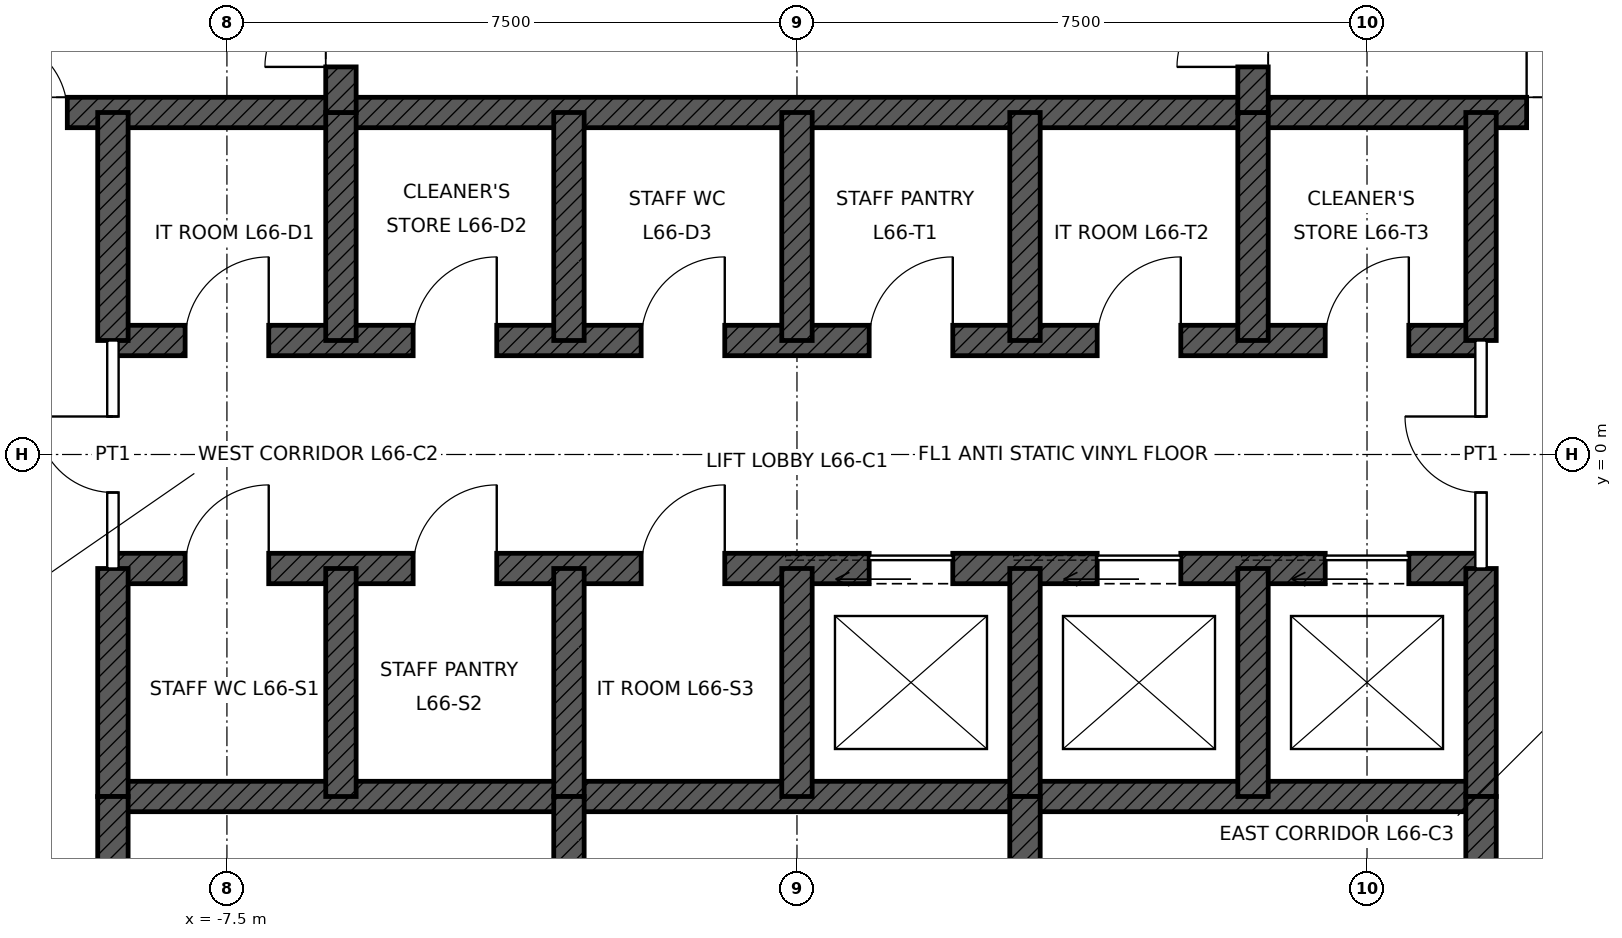
"""IFC4 building model, lengths in metres.
Left out: names, types, materials, properties, quantities, classifications, styles, units other than length and angle.
Written with IfcOpenShell. Run it as: python <this file> out.ifc"""

import sys

from ifc_helpers import new_model, si_unit, direction, frame, frame_2d, origin, place, context, subcontext, project, spatial, rectangle, extrude, element, fill, save


model = new_model("IFC4")
c1 = context("Model", 3, precision=1e-05, world=origin(), true_north=direction((0.0, 1.0)))
c2 = subcontext(c1, "Body", "Model", "MODEL_VIEW")
j1 = project(units=[si_unit("LENGTHUNIT", "METRE"), si_unit("PLANEANGLEUNIT", "RADIAN")], contexts=[c1])
p1 = place(None, origin())
s1 = spatial("IfcSite", under=j1, at=p1, CompositionType="ELEMENT")
p2 = place(p1, origin())
s2 = spatial("IfcBuilding", under=s1, at=p2, CompositionType="ELEMENT")
p3 = place(p2, frame((0.0, 0.0, 299.9)))
s3 = spatial("IfcBuildingStorey", under=s2, at=p3, CompositionType="ELEMENT", Elevation=299.9)
p4 = place(p3, frame((-11.0, 4.5, 0.0), z_axis=(0.0, 0.0, 1.0), x_axis=(1.0, 0.0, 0.0)))
e1 = element("IfcWall", 1, at=p4, inside=s3, PredefinedType="SHEAR", context=c2, shape_type="SweptSolid", body=[
    extrude(rectangle(XDim=22.0, YDim=0.4, at=frame_2d((11.0, 0.0))), origin(), (0.0, 0.0, 1.0), 4.0),
])
p5 = place(p4, frame((0.4, 0.0, 0.0)))
e2 = element("IfcOpeningElement", 2, at=p5, cuts=e1, PredefinedType="OPENING", context=c2, shape_type="SweptSolid", body=[
    extrude(rectangle(XDim=1.0, YDim=2.1, at=frame_2d((0.5, 1.05))), frame((0.0, 0.21, 0.0), z_axis=(0.0, -1.0, 0.0), x_axis=(1.0, 0.0, 0.0)), (0.0, 0.0, 1.0), 0.42),
])
p6 = place(p4, frame((20.6, 0.0, 0.0)))
e3 = element("IfcOpeningElement", 3, at=p6, cuts=e1, PredefinedType="OPENING", context=c2, shape_type="SweptSolid", body=[
    extrude(rectangle(XDim=1.0, YDim=2.1, at=frame_2d((0.5, 1.05))), frame((0.0, 0.21, 0.0), z_axis=(0.0, -1.0, 0.0), x_axis=(1.0, 0.0, 0.0)), (0.0, 0.0, 1.0), 0.42),
])
p7 = place(p3, frame((-9.0, 1.5, 0.0), z_axis=(0.0, 0.0, 1.0), x_axis=(1.0, 0.0, 0.0)))
e4 = element("IfcWall", 4, at=p7, inside=s3, PredefinedType="SHEAR", context=c2, shape_type="SweptSolid", body=[
    extrude(rectangle(XDim=18.0, YDim=0.4, at=frame_2d((9.0, 0.0))), origin(), (0.0, 0.0, 1.0), 4.0),
])
p8 = place(p7, frame((0.95, 0.0, 0.0)))
e5 = element("IfcOpeningElement", 5, at=p8, cuts=e4, PredefinedType="OPENING", context=c2, shape_type="SweptSolid", body=[
    extrude(rectangle(XDim=1.1, YDim=2.1, at=frame_2d((0.55, 1.05))), frame((0.0, 0.21, 0.0), z_axis=(0.0, -1.0, 0.0), x_axis=(1.0, 0.0, 0.0)), (0.0, 0.0, 1.0), 0.42),
])
p9 = place(p7, frame((3.95, 0.0, 0.0)))
e6 = element("IfcOpeningElement", 6, at=p9, cuts=e4, PredefinedType="OPENING", context=c2, shape_type="SweptSolid", body=[
    extrude(rectangle(XDim=1.1, YDim=2.1, at=frame_2d((0.55, 1.05))), frame((0.0, 0.21, 0.0), z_axis=(0.0, -1.0, 0.0), x_axis=(1.0, 0.0, 0.0)), (0.0, 0.0, 1.0), 0.42),
])
p10 = place(p7, frame((6.95, 0.0, 0.0)))
e7 = element("IfcOpeningElement", 7, at=p10, cuts=e4, PredefinedType="OPENING", context=c2, shape_type="SweptSolid", body=[
    extrude(rectangle(XDim=1.1, YDim=2.1, at=frame_2d((0.55, 1.05))), frame((0.0, 0.21, 0.0), z_axis=(0.0, -1.0, 0.0), x_axis=(1.0, 0.0, 0.0)), (0.0, 0.0, 1.0), 0.42),
])
p11 = place(p7, frame((9.95, 0.0, 0.0)))
e8 = element("IfcOpeningElement", 8, at=p11, cuts=e4, PredefinedType="OPENING", context=c2, shape_type="SweptSolid", body=[
    extrude(rectangle(XDim=1.1, YDim=2.1, at=frame_2d((0.55, 1.05))), frame((0.0, 0.21, 0.0), z_axis=(0.0, -1.0, 0.0), x_axis=(1.0, 0.0, 0.0)), (0.0, 0.0, 1.0), 0.42),
])
p12 = place(p7, frame((12.95, 0.0, 0.0)))
e9 = element("IfcOpeningElement", 9, at=p12, cuts=e4, PredefinedType="OPENING", context=c2, shape_type="SweptSolid", body=[
    extrude(rectangle(XDim=1.1, YDim=2.1, at=frame_2d((0.55, 1.05))), frame((0.0, 0.21, 0.0), z_axis=(0.0, -1.0, 0.0), x_axis=(1.0, 0.0, 0.0)), (0.0, 0.0, 1.0), 0.42),
])
p13 = place(p7, frame((15.95, 0.0, 0.0)))
e10 = element("IfcOpeningElement", 10, at=p13, cuts=e4, PredefinedType="OPENING", context=c2, shape_type="SweptSolid", body=[
    extrude(rectangle(XDim=1.1, YDim=2.1, at=frame_2d((0.55, 1.05))), frame((0.0, 0.21, 0.0), z_axis=(0.0, -1.0, 0.0), x_axis=(1.0, 0.0, 0.0)), (0.0, 0.0, 1.0), 0.42),
])
p14 = place(p3, frame((-9.0, -1.5, 0.0), z_axis=(0.0, 0.0, 1.0), x_axis=(1.0, 0.0, 0.0)))
e11 = element("IfcWall", 11, at=p14, inside=s3, PredefinedType="SHEAR", context=c2, shape_type="SweptSolid", body=[
    extrude(rectangle(XDim=18.0, YDim=0.4, at=frame_2d((9.0, 0.0))), origin(), (0.0, 0.0, 1.0), 4.0),
])
p15 = place(p14, frame((9.95, 0.0, 0.0)))
e12 = element("IfcOpeningElement", 12, at=p15, cuts=e11, PredefinedType="OPENING", context=c2, shape_type="SweptSolid", body=[
    extrude(rectangle(XDim=1.1, YDim=2.1, at=frame_2d((0.55, 1.05))), frame((0.0, 0.21, 0.0), z_axis=(0.0, -1.0, 0.0), x_axis=(1.0, 0.0, 0.0)), (0.0, 0.0, 1.0), 0.42),
])
p16 = place(p14, frame((12.95, 0.0, 0.0)))
e13 = element("IfcOpeningElement", 13, at=p16, cuts=e11, PredefinedType="OPENING", context=c2, shape_type="SweptSolid", body=[
    extrude(rectangle(XDim=1.1, YDim=2.1, at=frame_2d((0.55, 1.05))), frame((0.0, 0.21, 0.0), z_axis=(0.0, -1.0, 0.0), x_axis=(1.0, 0.0, 0.0)), (0.0, 0.0, 1.0), 0.42),
])
p17 = place(p14, frame((15.95, 0.0, 0.0)))
e14 = element("IfcOpeningElement", 14, at=p17, cuts=e11, PredefinedType="OPENING", context=c2, shape_type="SweptSolid", body=[
    extrude(rectangle(XDim=1.1, YDim=2.1, at=frame_2d((0.55, 1.05))), frame((0.0, 0.21, 0.0), z_axis=(0.0, -1.0, 0.0), x_axis=(1.0, 0.0, 0.0)), (0.0, 0.0, 1.0), 0.42),
])
p18 = place(p14, frame((0.95, 0.0, 0.0)))
e15 = element("IfcOpeningElement", 15, at=p18, cuts=e11, PredefinedType="OPENING", context=c2, shape_type="SweptSolid", body=[
    extrude(rectangle(XDim=1.1, YDim=2.1, at=frame_2d((0.55, 1.05))), frame((0.0, 0.21, 0.0), z_axis=(0.0, -1.0, 0.0), x_axis=(1.0, 0.0, 0.0)), (0.0, 0.0, 1.0), 0.42),
])
p19 = place(p14, frame((3.95, 0.0, 0.0)))
e16 = element("IfcOpeningElement", 16, at=p19, cuts=e11, PredefinedType="OPENING", context=c2, shape_type="SweptSolid", body=[
    extrude(rectangle(XDim=1.1, YDim=2.1, at=frame_2d((0.55, 1.05))), frame((0.0, 0.21, 0.0), z_axis=(0.0, -1.0, 0.0), x_axis=(1.0, 0.0, 0.0)), (0.0, 0.0, 1.0), 0.42),
])
p20 = place(p14, frame((6.95, 0.0, 0.0)))
e17 = element("IfcOpeningElement", 17, at=p20, cuts=e11, PredefinedType="OPENING", context=c2, shape_type="SweptSolid", body=[
    extrude(rectangle(XDim=1.1, YDim=2.1, at=frame_2d((0.55, 1.05))), frame((0.0, 0.21, 0.0), z_axis=(0.0, -1.0, 0.0), x_axis=(1.0, 0.0, 0.0)), (0.0, 0.0, 1.0), 0.42),
])
p21 = place(p3, frame((-9.0, -4.5, 0.0), z_axis=(0.0, 0.0, 1.0), x_axis=(1.0, 0.0, 0.0)))
e18 = element("IfcWall", 18, at=p21, inside=s3, PredefinedType="SHEAR", context=c2, shape_type="SweptSolid", body=[
    extrude(rectangle(XDim=18.0, YDim=0.4, at=frame_2d((9.0, 0.0))), origin(), (0.0, 0.0, 1.0), 4.0),
])
for number, where, z_axis, x_axis in (
    (19, (-9.0, 1.5, 0.0), (0.0, 0.0, 1.0), (0.0, 1.0, 0.0)),
    (20, (9.0, 1.5, 0.0), (0.0, 0.0, 1.0), (0.0, 1.0, 0.0)),
    (21, (-9.0, -4.5, 0.0), (0.0, 0.0, 1.0), (0.0, 1.0, 0.0)),
    (22, (9.0, -4.5, 0.0), (0.0, 0.0, 1.0), (0.0, 1.0, 0.0)),
    (23, (-6.0, 1.5, 0.0), (0.0, 0.0, 1.0), (0.0, 1.0, 0.0)),
    (24, (-3.0, 1.5, 0.0), (0.0, 0.0, 1.0), (0.0, 1.0, 0.0)),
    (25, (0.0, 1.5, 0.0), (0.0, 0.0, 1.0), (0.0, 1.0, 0.0)),
    (26, (3.0, 1.5, 0.0), (0.0, 0.0, 1.0), (0.0, 1.0, 0.0)),
    (27, (6.0, 1.5, 0.0), (0.0, 0.0, 1.0), (0.0, 1.0, 0.0)),
    (28, (-6.0, -4.5, 0.0), (0.0, 0.0, 1.0), (0.0, 1.0, 0.0)),
    (29, (-3.0, -4.5, 0.0), (0.0, 0.0, 1.0), (0.0, 1.0, 0.0)),
    (30, (0.0, -4.5, 0.0), (0.0, 0.0, 1.0), (0.0, 1.0, 0.0)),
    (31, (3.0, -4.5, 0.0), (0.0, 0.0, 1.0), (0.0, 1.0, 0.0)),
    (32, (6.0, -4.5, 0.0), (0.0, 0.0, 1.0), (0.0, 1.0, 0.0)),
):
    element("IfcWall", number, at=place(p3, frame(where, z_axis=z_axis, x_axis=x_axis)), inside=s3, PredefinedType="SHEAR", context=c2, shape_type="SweptSolid", body=[
        extrude(rectangle(XDim=3.0, YDim=0.4, at=frame_2d((1.5, 0.0))), origin(), (0.0, 0.0, 1.0), 4.0),
    ])
p22 = place(p3, frame((-6.0, 4.5, 0.0), z_axis=(0.0, 0.0, 1.0), x_axis=(0.0, 1.0, 0.0)))
e33 = element("IfcWall", 33, at=p22, inside=s3, PredefinedType="SHEAR", context=c2, shape_type="SweptSolid", body=[
    extrude(rectangle(XDim=6.5, YDim=0.4, at=frame_2d((3.25, 0.0))), origin(), (0.0, 0.0, 1.0), 4.0),
])
p23 = place(p22, frame((0.6, 0.0, 0.0)))
e34 = element("IfcOpeningElement", 34, at=p23, cuts=e33, PredefinedType="OPENING", context=c2, shape_type="SweptSolid", body=[
    extrude(rectangle(XDim=1.0, YDim=2.1, at=frame_2d((0.5, 1.05))), frame((0.0, 0.21, 0.0), z_axis=(0.0, -1.0, 0.0), x_axis=(1.0, 0.0, 0.0)), (0.0, 0.0, 1.0), 0.42),
])
p24 = place(p3, frame((6.0, 4.5, 0.0), z_axis=(0.0, 0.0, 1.0), x_axis=(0.0, 1.0, 0.0)))
e35 = element("IfcWall", 35, at=p24, inside=s3, PredefinedType="SHEAR", context=c2, shape_type="SweptSolid", body=[
    extrude(rectangle(XDim=6.5, YDim=0.4, at=frame_2d((3.25, 0.0))), origin(), (0.0, 0.0, 1.0), 4.0),
])
p25 = place(p24, frame((0.6, 0.0, 0.0)))
e36 = element("IfcOpeningElement", 36, at=p25, cuts=e35, PredefinedType="OPENING", context=c2, shape_type="SweptSolid", body=[
    extrude(rectangle(XDim=1.0, YDim=2.1, at=frame_2d((0.5, 1.05))), frame((0.0, 0.21, 0.0), z_axis=(0.0, -1.0, 0.0), x_axis=(1.0, 0.0, 0.0)), (0.0, 0.0, 1.0), 0.42),
])
p26 = place(p3, frame((-9.0, -11.0, 0.0), z_axis=(0.0, 0.0, 1.0), x_axis=(0.0, 1.0, 0.0)))
e37 = element("IfcWall", 37, at=p26, inside=s3, PredefinedType="SHEAR", context=c2, shape_type="SweptSolid", body=[
    extrude(rectangle(XDim=6.5, YDim=0.4, at=frame_2d((3.25, 0.0))), origin(), (0.0, 0.0, 1.0), 4.0),
])
p27 = place(p26, frame((4.25, 0.0, 0.0)))
e38 = element("IfcOpeningElement", 38, at=p27, cuts=e37, PredefinedType="OPENING", context=c2, shape_type="SweptSolid", body=[
    extrude(rectangle(XDim=1.0, YDim=2.1, at=frame_2d((0.5, 1.05))), frame((0.0, 0.21, 0.0), z_axis=(0.0, -1.0, 0.0), x_axis=(1.0, 0.0, 0.0)), (0.0, 0.0, 1.0), 0.42),
])
p28 = place(p3, frame((9.0, -11.0, 0.0), z_axis=(0.0, 0.0, 1.0), x_axis=(0.0, 1.0, 0.0)))
e39 = element("IfcWall", 39, at=p28, inside=s3, PredefinedType="SHEAR", context=c2, shape_type="SweptSolid", body=[
    extrude(rectangle(XDim=6.5, YDim=0.4, at=frame_2d((3.25, 0.0))), origin(), (0.0, 0.0, 1.0), 4.0),
])
p29 = place(p28, frame((4.25, 0.0, 0.0)))
e40 = element("IfcOpeningElement", 40, at=p29, cuts=e39, PredefinedType="OPENING", context=c2, shape_type="SweptSolid", body=[
    extrude(rectangle(XDim=1.0, YDim=2.1, at=frame_2d((0.5, 1.05))), frame((0.0, 0.21, 0.0), z_axis=(0.0, -1.0, 0.0), x_axis=(1.0, 0.0, 0.0)), (0.0, 0.0, 1.0), 0.42),
])
for number, where, z_axis, x_axis in (
    (41, (-3.0, -11.0, 0.0), (0.0, 0.0, 1.0), (0.0, 1.0, 0.0)),
    (42, (3.0, -11.0, 0.0), (0.0, 0.0, 1.0), (0.0, 1.0, 0.0)),
):
    element("IfcWall", number, at=place(p3, frame(where, z_axis=z_axis, x_axis=x_axis)), inside=s3, PredefinedType="SHEAR", context=c2, shape_type="SweptSolid", body=[
        extrude(rectangle(XDim=6.5, YDim=0.4, at=frame_2d((3.25, 0.0))), origin(), (0.0, 0.0, 1.0), 4.0),
    ])
p30 = place(p3, frame((-9.0, -1.5, 0.0), z_axis=(0.0, 0.0, 1.0), x_axis=(0.0, 1.0, 0.0)))
e43 = element("IfcWall", 43, at=p30, inside=s3, PredefinedType="PARTITIONING", context=c2, shape_type="SweptSolid", body=[
    extrude(rectangle(XDim=3.0, YDim=0.15, at=frame_2d((1.5, 0.0))), origin(), (0.0, 0.0, 1.0), 3.75),
])
p31 = place(p30, frame((1.0, 0.0, 0.0)))
e44 = element("IfcOpeningElement", 44, at=p31, cuts=e43, PredefinedType="OPENING", context=c2, shape_type="SweptSolid", body=[
    extrude(rectangle(XDim=1.0, YDim=2.4, at=frame_2d((0.5, 1.2))), frame((0.0, 0.085, 0.0), z_axis=(0.0, -1.0, 0.0), x_axis=(1.0, 0.0, 0.0)), (0.0, 0.0, 1.0), 0.17),
])
p32 = place(p3, frame((9.0, -1.5, 0.0), z_axis=(0.0, 0.0, 1.0), x_axis=(0.0, 1.0, 0.0)))
e45 = element("IfcWall", 45, at=p32, inside=s3, PredefinedType="PARTITIONING", context=c2, shape_type="SweptSolid", body=[
    extrude(rectangle(XDim=3.0, YDim=0.15, at=frame_2d((1.5, 0.0))), origin(), (0.0, 0.0, 1.0), 3.75),
])
p33 = place(p32, frame((1.0, 0.0, 0.0)))
e46 = element("IfcOpeningElement", 46, at=p33, cuts=e45, PredefinedType="OPENING", context=c2, shape_type="SweptSolid", body=[
    extrude(rectangle(XDim=1.0, YDim=2.4, at=frame_2d((0.5, 1.2))), frame((0.0, 0.085, 0.0), z_axis=(0.0, -1.0, 0.0), x_axis=(1.0, 0.0, 0.0)), (0.0, 0.0, 1.0), 0.17),
])
p34 = place(p5, origin())
e47 = element("IfcDoor", 47, at=p34, inside=s3, OperationType="SINGLE_SWING_LEFT", PredefinedType="DOOR", context=c2, shape_type="SweptSolid", body=[
    extrude(rectangle(XDim=1.0, YDim=2.1, at=frame_2d((0.5, 1.05))), frame((0.0, 0.025, 0.0), z_axis=(0.0, -1.0, 0.0), x_axis=(1.0, 0.0, 0.0)), (0.0, 0.0, 1.0), 0.05),
])
fill(e2, e47)
p35 = place(p6, origin())
e48 = element("IfcDoor", 48, at=p35, inside=s3, OperationType="SINGLE_SWING_LEFT", PredefinedType="DOOR", context=c2, shape_type="SweptSolid", body=[
    extrude(rectangle(XDim=1.0, YDim=2.1, at=frame_2d((0.5, 1.05))), frame((0.0, 0.025, 0.0), z_axis=(0.0, -1.0, 0.0), x_axis=(1.0, 0.0, 0.0)), (0.0, 0.0, 1.0), 0.05),
])
fill(e3, e48)
p36 = place(p23, origin())
e49 = element("IfcDoor", 49, at=p36, inside=s3, OperationType="SINGLE_SWING_LEFT", PredefinedType="DOOR", context=c2, shape_type="SweptSolid", body=[
    extrude(rectangle(XDim=1.0, YDim=2.1, at=frame_2d((0.5, 1.05))), frame((0.0, 0.025, 0.0), z_axis=(0.0, -1.0, 0.0), x_axis=(1.0, 0.0, 0.0)), (0.0, 0.0, 1.0), 0.05),
])
fill(e34, e49)
p37 = place(p25, origin())
e50 = element("IfcDoor", 50, at=p37, inside=s3, OperationType="SINGLE_SWING_LEFT", PredefinedType="DOOR", context=c2, shape_type="SweptSolid", body=[
    extrude(rectangle(XDim=1.0, YDim=2.1, at=frame_2d((0.5, 1.05))), frame((0.0, 0.025, 0.0), z_axis=(0.0, -1.0, 0.0), x_axis=(1.0, 0.0, 0.0)), (0.0, 0.0, 1.0), 0.05),
])
fill(e36, e50)
p38 = place(p15, origin())
e51 = element("IfcDoor", 51, at=p38, inside=s3, OperationType="SLIDING_TO_LEFT", PredefinedType="DOOR", context=c2, shape_type="SweptSolid", body=[
    extrude(rectangle(XDim=1.1, YDim=2.1, at=frame_2d((0.55, 1.05))), frame((0.0, 0.025, 0.0), z_axis=(0.0, -1.0, 0.0), x_axis=(1.0, 0.0, 0.0)), (0.0, 0.0, 1.0), 0.05),
])
fill(e12, e51)
p39 = place(p16, origin())
e52 = element("IfcDoor", 52, at=p39, inside=s3, OperationType="SLIDING_TO_LEFT", PredefinedType="DOOR", context=c2, shape_type="SweptSolid", body=[
    extrude(rectangle(XDim=1.1, YDim=2.1, at=frame_2d((0.55, 1.05))), frame((0.0, 0.025, 0.0), z_axis=(0.0, -1.0, 0.0), x_axis=(1.0, 0.0, 0.0)), (0.0, 0.0, 1.0), 0.05),
])
fill(e13, e52)
p40 = place(p17, origin())
e53 = element("IfcDoor", 53, at=p40, inside=s3, OperationType="SLIDING_TO_LEFT", PredefinedType="DOOR", context=c2, shape_type="SweptSolid", body=[
    extrude(rectangle(XDim=1.1, YDim=2.1, at=frame_2d((0.55, 1.05))), frame((0.0, 0.025, 0.0), z_axis=(0.0, -1.0, 0.0), x_axis=(1.0, 0.0, 0.0)), (0.0, 0.0, 1.0), 0.05),
])
fill(e14, e53)
p41 = place(p31, origin())
e54 = element("IfcDoor", 54, at=p41, inside=s3, OperationType="SINGLE_SWING_RIGHT", PredefinedType="DOOR", context=c2, shape_type="SweptSolid", body=[
    extrude(rectangle(XDim=1.0, YDim=2.4, at=frame_2d((0.5, 1.2))), frame((0.0, 0.025, 0.0), z_axis=(0.0, -1.0, 0.0), x_axis=(1.0, 0.0, 0.0)), (0.0, 0.0, 1.0), 0.05),
])
fill(e44, e54)
p42 = place(p33, origin())
e55 = element("IfcDoor", 55, at=p42, inside=s3, OperationType="SINGLE_SWING_RIGHT", PredefinedType="DOOR", context=c2, shape_type="SweptSolid", body=[
    extrude(rectangle(XDim=1.0, YDim=2.4, at=frame_2d((0.5, 1.2))), frame((0.0, 0.025, 0.0), z_axis=(0.0, -1.0, 0.0), x_axis=(1.0, 0.0, 0.0)), (0.0, 0.0, 1.0), 0.05),
])
fill(e46, e55)
p43 = place(p8, origin())
e56 = element("IfcDoor", 56, at=p43, inside=s3, OperationType="SINGLE_SWING_RIGHT", PredefinedType="DOOR", context=c2, shape_type="SweptSolid", body=[
    extrude(rectangle(XDim=1.1, YDim=2.1, at=frame_2d((0.55, 1.05))), frame((0.0, 0.025, 0.0), z_axis=(0.0, -1.0, 0.0), x_axis=(1.0, 0.0, 0.0)), (0.0, 0.0, 1.0), 0.05),
])
fill(e5, e56)
p44 = place(p9, origin())
e57 = element("IfcDoor", 57, at=p44, inside=s3, OperationType="SINGLE_SWING_RIGHT", PredefinedType="DOOR", context=c2, shape_type="SweptSolid", body=[
    extrude(rectangle(XDim=1.1, YDim=2.1, at=frame_2d((0.55, 1.05))), frame((0.0, 0.025, 0.0), z_axis=(0.0, -1.0, 0.0), x_axis=(1.0, 0.0, 0.0)), (0.0, 0.0, 1.0), 0.05),
])
fill(e6, e57)
p45 = place(p10, origin())
e58 = element("IfcDoor", 58, at=p45, inside=s3, OperationType="SINGLE_SWING_RIGHT", PredefinedType="DOOR", context=c2, shape_type="SweptSolid", body=[
    extrude(rectangle(XDim=1.1, YDim=2.1, at=frame_2d((0.55, 1.05))), frame((0.0, 0.025, 0.0), z_axis=(0.0, -1.0, 0.0), x_axis=(1.0, 0.0, 0.0)), (0.0, 0.0, 1.0), 0.05),
])
fill(e7, e58)
p46 = place(p11, origin())
e59 = element("IfcDoor", 59, at=p46, inside=s3, OperationType="SINGLE_SWING_RIGHT", PredefinedType="DOOR", context=c2, shape_type="SweptSolid", body=[
    extrude(rectangle(XDim=1.1, YDim=2.1, at=frame_2d((0.55, 1.05))), frame((0.0, 0.025, 0.0), z_axis=(0.0, -1.0, 0.0), x_axis=(1.0, 0.0, 0.0)), (0.0, 0.0, 1.0), 0.05),
])
fill(e8, e59)
p47 = place(p12, origin())
e60 = element("IfcDoor", 60, at=p47, inside=s3, OperationType="SINGLE_SWING_RIGHT", PredefinedType="DOOR", context=c2, shape_type="SweptSolid", body=[
    extrude(rectangle(XDim=1.1, YDim=2.1, at=frame_2d((0.55, 1.05))), frame((0.0, 0.025, 0.0), z_axis=(0.0, -1.0, 0.0), x_axis=(1.0, 0.0, 0.0)), (0.0, 0.0, 1.0), 0.05),
])
fill(e9, e60)
p48 = place(p13, origin())
e61 = element("IfcDoor", 61, at=p48, inside=s3, OperationType="SINGLE_SWING_RIGHT", PredefinedType="DOOR", context=c2, shape_type="SweptSolid", body=[
    extrude(rectangle(XDim=1.1, YDim=2.1, at=frame_2d((0.55, 1.05))), frame((0.0, 0.025, 0.0), z_axis=(0.0, -1.0, 0.0), x_axis=(1.0, 0.0, 0.0)), (0.0, 0.0, 1.0), 0.05),
])
fill(e10, e61)
p49 = place(p18, origin())
e62 = element("IfcDoor", 62, at=p49, inside=s3, OperationType="SINGLE_SWING_RIGHT", PredefinedType="DOOR", context=c2, shape_type="SweptSolid", body=[
    extrude(rectangle(XDim=1.1, YDim=2.1, at=frame_2d((0.55, 1.05))), frame((0.0, 0.025, 0.0), z_axis=(0.0, -1.0, 0.0), x_axis=(1.0, 0.0, 0.0)), (0.0, 0.0, 1.0), 0.05),
])
fill(e15, e62)
p50 = place(p19, origin())
e63 = element("IfcDoor", 63, at=p50, inside=s3, OperationType="SINGLE_SWING_RIGHT", PredefinedType="DOOR", context=c2, shape_type="SweptSolid", body=[
    extrude(rectangle(XDim=1.1, YDim=2.1, at=frame_2d((0.55, 1.05))), frame((0.0, 0.025, 0.0), z_axis=(0.0, -1.0, 0.0), x_axis=(1.0, 0.0, 0.0)), (0.0, 0.0, 1.0), 0.05),
])
fill(e16, e63)
p51 = place(p20, origin())
e64 = element("IfcDoor", 64, at=p51, inside=s3, OperationType="SINGLE_SWING_RIGHT", PredefinedType="DOOR", context=c2, shape_type="SweptSolid", body=[
    extrude(rectangle(XDim=1.1, YDim=2.1, at=frame_2d((0.55, 1.05))), frame((0.0, 0.025, 0.0), z_axis=(0.0, -1.0, 0.0), x_axis=(1.0, 0.0, 0.0)), (0.0, 0.0, 1.0), 0.05),
])
fill(e17, e64)
save(model, sys.argv[1])
